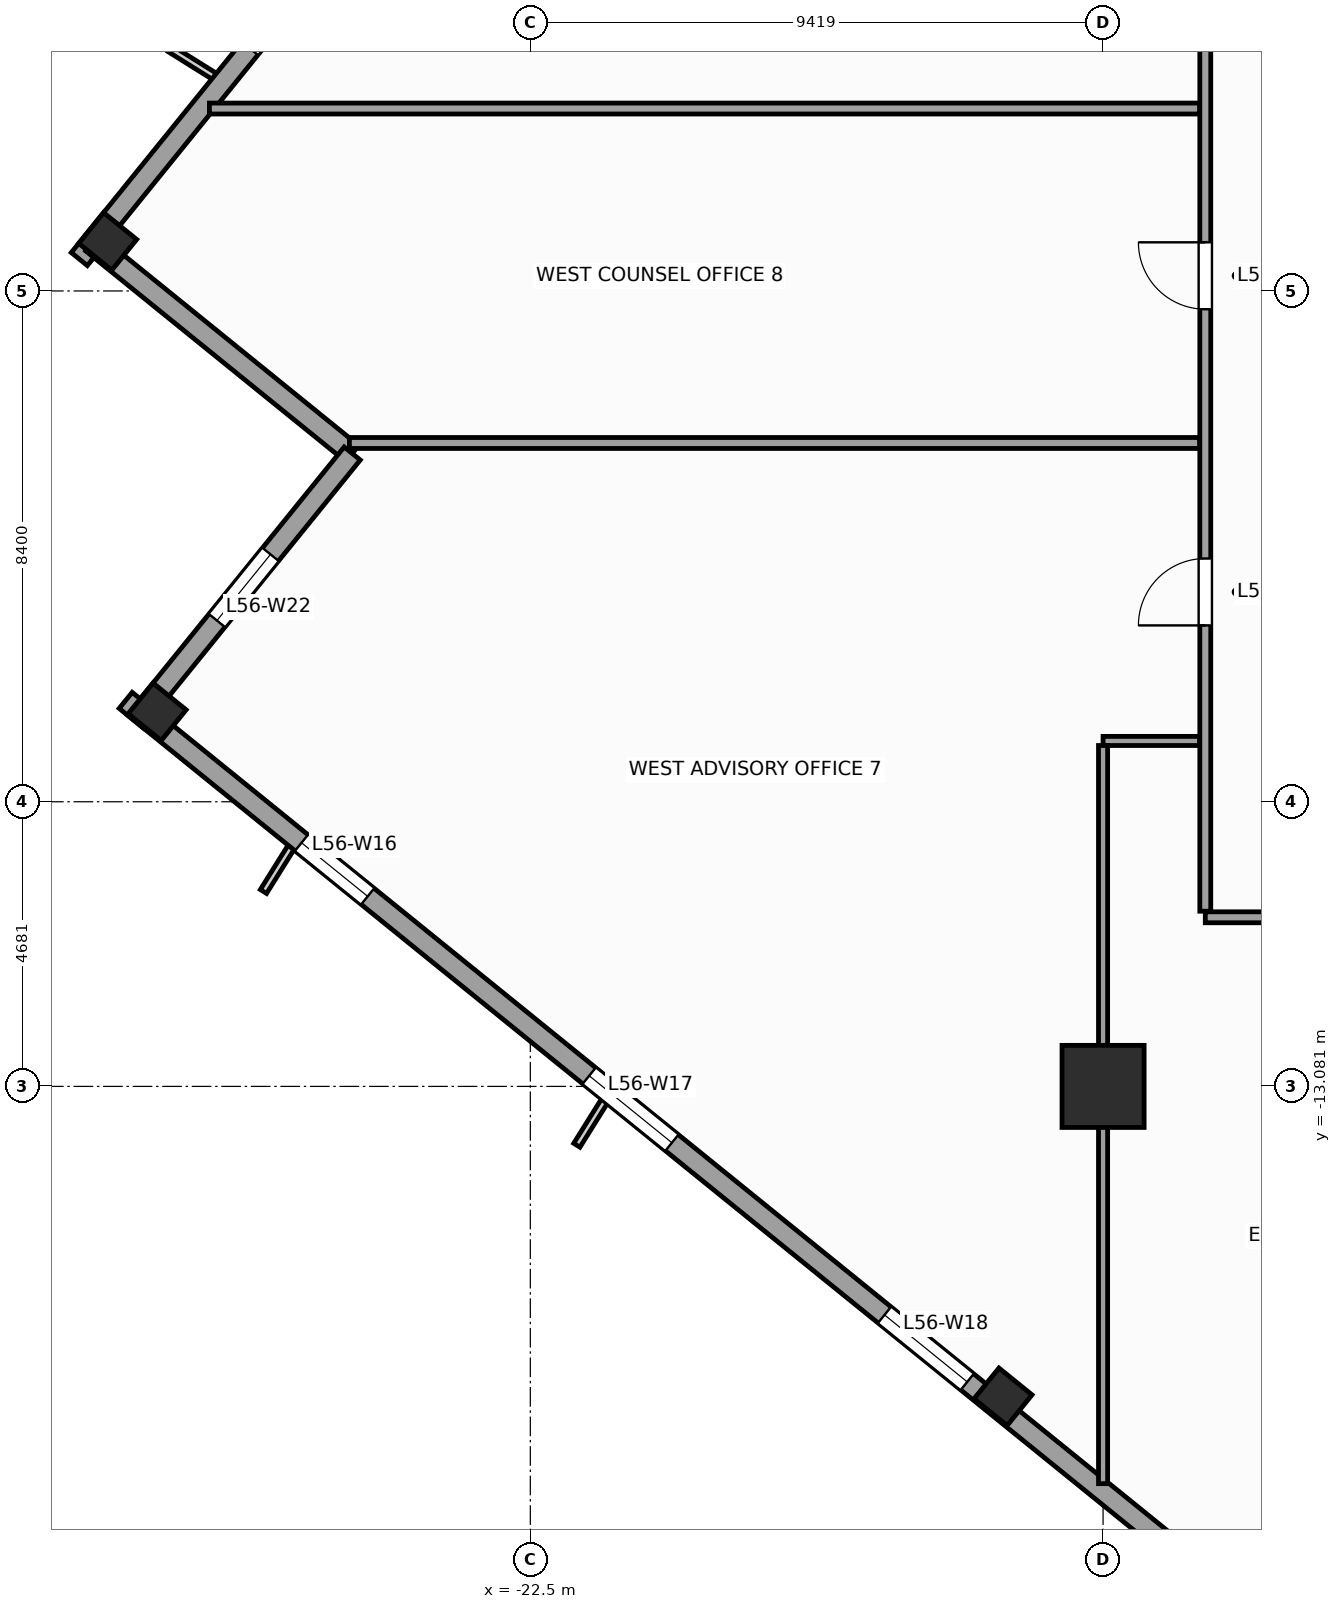
"""IFC4 building model, lengths in metres.
Left out: names, types, materials, properties, quantities, classifications, styles, units other than length and angle.
Written with IfcOpenShell. Run it as: python <this file> out.ifc"""

import sys

from ifc_helpers import new_model, si_unit, direction, frame, frame_2d, origin, origin_2d, place, context, subcontext, project, spatial, rectangle, extrude, source, transform, mapped, element, fill, save


model = new_model("IFC4")
c1 = context("Model", 3, precision=1e-05, world=origin(), true_north=direction((0.0, 1.0)))
c2 = subcontext(c1, "Body", "Model", "MODEL_VIEW")
j1 = project(units=[si_unit("LENGTHUNIT", "METRE"), si_unit("PLANEANGLEUNIT", "RADIAN")], contexts=[c1])
p1 = place(None, origin())
s1 = spatial("IfcSite", under=j1, at=p1, CompositionType="ELEMENT")
p2 = place(p1, origin())
s2 = spatial("IfcBuilding", under=s1, at=p2, CompositionType="ELEMENT")
p3 = place(p2, frame((0.0, 0.0, 232.9)))
s3 = spatial("IfcBuildingStorey", under=s2, at=p3, CompositionType="ELEMENT", Elevation=232.9)
m1 = source(origin(), c2, "Body", "SweptSolid", [
    extrude(rectangle(XDim=1.35, YDim=1.35, at=origin_2d()), origin(), (0.0, 0.0, 1.0), 3.9),
])
p4 = place(p3, frame((-13.081, -13.081, 0.0), z_axis=(0.0, 0.0, 1.0), x_axis=(1.0, 0.0, 0.0)))
e1 = element("IfcColumn", 1, at=p4, inside=s3, PredefinedType="COLUMN", context=c2, shape_type="MappedRepresentation", body=[
    mapped(m1, transform((0.0, 0.0, 0.0), scale=1.0)),
])
m2 = source(origin(), c2, "Body", "SweptSolid", [
    extrude(rectangle(XDim=0.65, YDim=0.7, at=origin_2d()), origin(), (0.0, 0.0, 1.0), 3.9),
])
for number, where, z_axis, x_axis in (
    (2, (-29.45, 0.815, 0.0), (0.0, 0.0, 1.0), (0.629, 0.777, 0.0)),
    (3, (-28.637, -6.92, 0.0), (0.0, 0.0, 1.0), (0.629, 0.777, 0.0)),
    (4, (-14.726, -18.185, 0.0), (0.0, 0.0, 1.0), (0.629, 0.777, 0.0)),
):
    element("IfcColumn", number, at=place(p3, frame(where, z_axis=z_axis, x_axis=x_axis)), inside=s3, PredefinedType="COLUMN", context=c2, shape_type="MappedRepresentation", body=[
        mapped(m2, transform((0.0, 0.0, 0.0), scale=1.0)),
    ])
p5 = place(p3, frame((-6.733, 29.154, 0.0), z_axis=(0.0, 0.0, 1.0), x_axis=(-0.629325378072, -0.77714192302, 0.0)))
e5 = element("IfcWall", 5, at=p5, inside=s3, PredefinedType="STANDARD", context=c2, shape_type="SweptSolid", body=[
    extrude(rectangle(XDim=36.84, YDim=0.34, at=frame_2d((18.42, 0.0))), origin(), (0.0, 0.0, 1.0), 2.96),
])
p6 = place(p5, frame((23.495, 0.0, 0.0)))
e6 = element("IfcOpeningElement", 6, at=p6, cuts=e5, PredefinedType="OPENING", context=c2, shape_type="SweptSolid", body=[
    extrude(rectangle(XDim=1.05, YDim=2.25, at=frame_2d((0.525, 1.125))), frame((0.0, 0.18, 0.0), z_axis=(0.0, -1.0, 0.0), x_axis=(1.0, 0.0, 0.0)), (0.0, 0.0, 1.0), 0.36),
])
p7 = place(p5, frame((3.721, 0.0, 0.48)))
e7 = element("IfcOpeningElement", 7, at=p7, cuts=e5, PredefinedType="OPENING", context=c2, shape_type="SweptSolid", body=[
    extrude(rectangle(XDim=1.4, YDim=2.4, at=frame_2d((0.7, 1.2))), frame((0.0, 0.18, 0.0), z_axis=(0.0, -1.0, 0.0), x_axis=(1.0, 0.0, 0.0)), (0.0, 0.0, 1.0), 0.36),
])
p8 = place(p5, frame((10.559, 0.0, 0.58)))
e8 = element("IfcOpeningElement", 8, at=p8, cuts=e5, PredefinedType="OPENING", context=c2, shape_type="SweptSolid", body=[
    extrude(rectangle(XDim=1.75, YDim=2.3, at=frame_2d((0.875, 1.15))), frame((0.0, 0.18, 0.0), z_axis=(0.0, -1.0, 0.0), x_axis=(1.0, 0.0, 0.0)), (0.0, 0.0, 1.0), 0.36),
])
p9 = place(p5, frame((16.058, 0.0, 0.58)))
e9 = element("IfcOpeningElement", 9, at=p9, cuts=e5, PredefinedType="OPENING", context=c2, shape_type="SweptSolid", body=[
    extrude(rectangle(XDim=1.75, YDim=2.3, at=frame_2d((0.875, 1.15))), frame((0.0, 0.18, 0.0), z_axis=(0.0, -1.0, 0.0), x_axis=(1.0, 0.0, 0.0)), (0.0, 0.0, 1.0), 0.36),
])
p10 = place(p5, frame((25.676, 0.0, 0.58)))
e10 = element("IfcOpeningElement", 10, at=p10, cuts=e5, PredefinedType="OPENING", context=c2, shape_type="SweptSolid", body=[
    extrude(rectangle(XDim=1.75, YDim=2.3, at=frame_2d((0.875, 1.15))), frame((0.0, 0.18, 0.0), z_axis=(0.0, -1.0, 0.0), x_axis=(1.0, 0.0, 0.0)), (0.0, 0.0, 1.0), 0.36),
])
p11 = place(p5, frame((30.982, 0.0, 0.48)))
e11 = element("IfcOpeningElement", 11, at=p11, cuts=e5, PredefinedType="OPENING", context=c2, shape_type="SweptSolid", body=[
    extrude(rectangle(XDim=1.4, YDim=2.4, at=frame_2d((0.7, 1.2))), frame((0.0, 0.18, 0.0), z_axis=(0.0, -1.0, 0.0), x_axis=(1.0, 0.0, 0.0)), (0.0, 0.0, 1.0), 0.36),
])
p12 = place(p3, frame((-29.703, 0.789, 0.0), z_axis=(0.0, 0.0, 1.0), x_axis=(0.77714355312, -0.629323365087, 0.0)))
e12 = element("IfcWall", 12, at=p12, inside=s3, PredefinedType="STANDARD", context=c2, shape_type="SweptSolid", body=[
    extrude(rectangle(XDim=5.5, YDim=0.34, at=frame_2d((2.75, 0.0))), origin(), (0.0, 0.0, 1.0), 3.66),
])
p13 = place(p3, frame((-25.429, -2.673, 0.0), z_axis=(0.0, 0.0, 1.0), x_axis=(-0.629299794138, -0.777162640055, 0.0)))
e13 = element("IfcWall", 13, at=p13, inside=s3, PredefinedType="STANDARD", context=c2, shape_type="SweptSolid", body=[
    extrude(rectangle(XDim=5.67, YDim=0.34, at=frame_2d((2.835, 0.0))), origin(), (0.0, 0.0, 1.0), 3.66),
])
p14 = place(p13, frame((2.135, 0.0, 0.48)))
e14 = element("IfcOpeningElement", 14, at=p14, cuts=e13, PredefinedType="OPENING", context=c2, shape_type="SweptSolid", body=[
    extrude(rectangle(XDim=1.4, YDim=2.4, at=frame_2d((0.7, 1.2))), frame((0.0, 0.18, 0.0), z_axis=(0.0, -1.0, 0.0), x_axis=(1.0, 0.0, 0.0)), (0.0, 0.0, 1.0), 0.36),
])
p15 = place(p3, frame((-29.154, -6.733, 0.0), z_axis=(0.0, 0.0, 1.0), x_axis=(0.77714192302, -0.629325378072, 0.0)))
e15 = element("IfcWall", 15, at=p15, inside=s3, PredefinedType="STANDARD", context=c2, shape_type="SweptSolid", body=[
    extrude(rectangle(XDim=36.84, YDim=0.34, at=frame_2d((18.42, 0.0))), origin(), (0.0, 0.0, 1.0), 2.96),
])
p16 = place(p15, frame((3.721, 0.0, 0.48)))
e16 = element("IfcOpeningElement", 16, at=p16, cuts=e15, PredefinedType="OPENING", context=c2, shape_type="SweptSolid", body=[
    extrude(rectangle(XDim=1.4, YDim=2.4, at=frame_2d((0.7, 1.2))), frame((0.0, 0.18, 0.0), z_axis=(0.0, -1.0, 0.0), x_axis=(1.0, 0.0, 0.0)), (0.0, 0.0, 1.0), 0.36),
])
p17 = place(p15, frame((9.809, 0.0, 0.58)))
e17 = element("IfcOpeningElement", 17, at=p17, cuts=e15, PredefinedType="OPENING", context=c2, shape_type="SweptSolid", body=[
    extrude(rectangle(XDim=1.75, YDim=2.3, at=frame_2d((0.875, 1.15))), frame((0.0, 0.18, 0.0), z_axis=(0.0, -1.0, 0.0), x_axis=(1.0, 0.0, 0.0)), (0.0, 0.0, 1.0), 0.36),
])
p18 = place(p15, frame((16.058, 0.0, 0.58)))
e18 = element("IfcOpeningElement", 18, at=p18, cuts=e15, PredefinedType="OPENING", context=c2, shape_type="SweptSolid", body=[
    extrude(rectangle(XDim=1.75, YDim=2.3, at=frame_2d((0.875, 1.15))), frame((0.0, 0.18, 0.0), z_axis=(0.0, -1.0, 0.0), x_axis=(1.0, 0.0, 0.0)), (0.0, 0.0, 1.0), 0.36),
])
p19 = place(p15, frame((24.176, 0.0, 0.58)))
e19 = element("IfcOpeningElement", 19, at=p19, cuts=e15, PredefinedType="OPENING", context=c2, shape_type="SweptSolid", body=[
    extrude(rectangle(XDim=1.75, YDim=2.3, at=frame_2d((0.875, 1.15))), frame((0.0, 0.18, 0.0), z_axis=(0.0, -1.0, 0.0), x_axis=(1.0, 0.0, 0.0)), (0.0, 0.0, 1.0), 0.36),
])
p20 = place(p15, frame((32.482, 0.0, 0.48)))
e20 = element("IfcOpeningElement", 20, at=p20, cuts=e15, PredefinedType="OPENING", context=c2, shape_type="SweptSolid", body=[
    extrude(rectangle(XDim=1.4, YDim=2.4, at=frame_2d((0.7, 1.2))), frame((0.0, 0.18, 0.0), z_axis=(0.0, -1.0, 0.0), x_axis=(1.0, 0.0, 0.0)), (0.0, 0.0, 1.0), 0.36),
])
p21 = place(p3, frame((-11.4, -10.3, 0.0), z_axis=(0.0, 0.0, 1.0), x_axis=(1.0, 0.0, 0.0)))
e21 = element("IfcWall", 21, at=p21, inside=s3, PredefinedType="PARTITIONING", context=c2, shape_type="SweptSolid", body=[
    extrude(rectangle(XDim=21.7, YDim=0.18, at=frame_2d((10.85, 0.0))), origin(), (0.0, 0.0, 1.0), 3.66),
])
p22 = place(p21, frame((12.989, 0.0, 0.0)))
e22 = element("IfcOpeningElement", 22, at=p22, cuts=e21, PredefinedType="OPENING", context=c2, shape_type="SweptSolid", body=[
    extrude(rectangle(XDim=0.95, YDim=2.1, at=frame_2d((0.475, 1.05))), frame((0.0, 0.1, 0.0), z_axis=(0.0, -1.0, 0.0), x_axis=(1.0, 0.0, 0.0)), (0.0, 0.0, 1.0), 0.2),
])
p23 = place(p21, frame((17.585, 0.0, 0.0)))
e23 = element("IfcOpeningElement", 23, at=p23, cuts=e21, PredefinedType="OPENING", context=c2, shape_type="SweptSolid", body=[
    extrude(rectangle(XDim=1.1, YDim=2.2, at=frame_2d((0.55, 1.1))), frame((0.0, 0.1, 0.0), z_axis=(0.0, -1.0, 0.0), x_axis=(1.0, 0.0, 0.0)), (0.0, 0.0, 1.0), 0.2),
])
p24 = place(p21, frame((9.075, 0.0, 0.0)))
e24 = element("IfcOpeningElement", 24, at=p24, cuts=e21, PredefinedType="OPENING", context=c2, shape_type="SweptSolid", body=[
    extrude(rectangle(XDim=1.1, YDim=2.2, at=frame_2d((0.55, 1.1))), frame((0.0, 0.1, 0.0), z_axis=(0.0, -1.0, 0.0), x_axis=(1.0, 0.0, 0.0)), (0.0, 0.0, 1.0), 0.2),
])
p25 = place(p21, frame((3.724, 0.0, 0.0)))
e25 = element("IfcOpeningElement", 25, at=p25, cuts=e21, PredefinedType="OPENING", context=c2, shape_type="SweptSolid", body=[
    extrude(rectangle(XDim=1.1, YDim=2.2, at=frame_2d((0.55, 1.1))), frame((0.0, 0.1, 0.0), z_axis=(0.0, -1.0, 0.0), x_axis=(1.0, 0.0, 0.0)), (0.0, 0.0, 1.0), 0.2),
])
p26 = place(p3, frame((-11.4, -10.2, 0.0), z_axis=(0.0, 0.0, 1.0), x_axis=(0.0, 1.0, 0.0)))
e26 = element("IfcWall", 26, at=p26, inside=s3, PredefinedType="PARTITIONING", context=c2, shape_type="SweptSolid", body=[
    extrude(rectangle(XDim=20.4, YDim=0.18, at=frame_2d((10.2, 0.0))), origin(), (0.0, 0.0, 1.0), 3.66),
])
p27 = place(p26, frame((14.85, 0.0, 0.0)))
e27 = element("IfcOpeningElement", 27, at=p27, cuts=e26, PredefinedType="OPENING", context=c2, shape_type="SweptSolid", body=[
    extrude(rectangle(XDim=1.1, YDim=2.2, at=frame_2d((0.55, 1.1))), frame((0.0, 0.1, 0.0), z_axis=(0.0, -1.0, 0.0), x_axis=(1.0, 0.0, 0.0)), (0.0, 0.0, 1.0), 0.2),
])
p28 = place(p26, frame((4.7, 0.0, 0.0)))
e28 = element("IfcOpeningElement", 28, at=p28, cuts=e26, PredefinedType="OPENING", context=c2, shape_type="SweptSolid", body=[
    extrude(rectangle(XDim=1.1, YDim=2.2, at=frame_2d((0.55, 1.1))), frame((0.0, 0.1, 0.0), z_axis=(0.0, -1.0, 0.0), x_axis=(1.0, 0.0, 0.0)), (0.0, 0.0, 1.0), 0.2),
])
p29 = place(p26, frame((9.9, 0.0, 0.0)))
e29 = element("IfcOpeningElement", 29, at=p29, cuts=e26, PredefinedType="OPENING", context=c2, shape_type="SweptSolid", body=[
    extrude(rectangle(XDim=1.1, YDim=2.2, at=frame_2d((0.55, 1.1))), frame((0.0, 0.1, 0.0), z_axis=(0.0, -1.0, 0.0), x_axis=(1.0, 0.0, 0.0)), (0.0, 0.0, 1.0), 0.2),
])
p30 = place(p3, frame((-11.495, -2.5, 0.0), z_axis=(0.0, 0.0, 1.0), x_axis=(-1.0, 0.0, 0.0)))
e30 = element("IfcWall", 30, at=p30, inside=s3, PredefinedType="PARTITIONING", context=c2, shape_type="SweptSolid", body=[
    extrude(rectangle(XDim=13.98, YDim=0.18, at=frame_2d((6.99, 0.0))), origin(), (0.0, 0.0, 1.0), 3.66),
])
p31 = place(p3, frame((-11.495, 3.0, 0.0), z_axis=(0.0, 0.0, 1.0), x_axis=(-1.0, 0.0, 0.0)))
e31 = element("IfcWall", 31, at=p31, inside=s3, PredefinedType="PARTITIONING", context=c2, shape_type="SweptSolid", body=[
    extrude(rectangle(XDim=16.282, YDim=0.18, at=frame_2d((8.141, 0.0))), origin(), (0.0, 0.0, 1.0), 3.66),
])
p32 = place(p3, frame((-11.495, -7.4, 0.0), z_axis=(0.0, 0.0, 1.0), x_axis=(-1.0, 0.0, 0.0)))
e32 = element("IfcWall", 32, at=p32, inside=s3, PredefinedType="PARTITIONING", context=c2, shape_type="SweptSolid", body=[
    extrude(rectangle(XDim=1.586, YDim=0.15, at=frame_2d((0.793, 0.0))), origin(), (0.0, 0.0, 1.0), 3.66),
])
p33 = place(p3, frame((-13.081, -7.475, 0.0), z_axis=(0.0, 0.0, 1.0), x_axis=(0.0, -1.0, 0.0)))
e33 = element("IfcWall", 33, at=p33, inside=s3, PredefinedType="PARTITIONING", context=c2, shape_type="SweptSolid", body=[
    extrude(rectangle(XDim=12.139, YDim=0.15, at=frame_2d((6.069, 0.0))), origin(), (0.0, 0.0, 1.0), 2.76),
])
m3 = source(origin(), c2, "Body", "SweptSolid", [
    extrude(rectangle(XDim=1.4, YDim=2.4, at=frame_2d((0.7, 1.2))), frame((0.0, 0.03, 0.0), z_axis=(0.0, -1.0, 0.0), x_axis=(1.0, 0.0, 0.0)), (0.0, 0.0, 1.0), 0.06),
])
p34 = place(p16, origin())
e34 = element("IfcWindow", 34, at=p34, inside=s3, PartitioningType="SINGLE_PANEL", PredefinedType="WINDOW", context=c2, shape_type="MappedRepresentation", body=[
    mapped(m3, transform((0.0, 0.0, 0.0), scale=1.0)),
])
fill(e16, e34)
m4 = source(origin(), c2, "Body", "SweptSolid", [
    extrude(rectangle(XDim=1.75, YDim=2.3, at=frame_2d((0.875, 1.15))), frame((0.0, 0.03, 0.0), z_axis=(0.0, -1.0, 0.0), x_axis=(1.0, 0.0, 0.0)), (0.0, 0.0, 1.0), 0.06),
])
p35 = place(p17, origin())
e35 = element("IfcWindow", 35, at=p35, inside=s3, PartitioningType="SINGLE_PANEL", PredefinedType="WINDOW", context=c2, shape_type="MappedRepresentation", body=[
    mapped(m4, transform((0.0, 0.0, 0.0), scale=1.0)),
])
fill(e17, e35)
p36 = place(p18, origin())
e36 = element("IfcWindow", 36, at=p36, inside=s3, PartitioningType="SINGLE_PANEL", PredefinedType="WINDOW", context=c2, shape_type="MappedRepresentation", body=[
    mapped(m4, transform((0.0, 0.0, 0.0), scale=1.0)),
])
fill(e18, e36)
p37 = place(p14, origin())
e37 = element("IfcWindow", 37, at=p37, inside=s3, PartitioningType="SINGLE_PANEL", PredefinedType="WINDOW", context=c2, shape_type="MappedRepresentation", body=[
    mapped(m3, transform((0.0, 0.0, 0.0), scale=1.0)),
])
fill(e14, e37)
m5 = source(origin(), c2, "Body", "SweptSolid", [
    extrude(rectangle(XDim=1.1, YDim=2.2, at=frame_2d((0.55, 1.1))), frame((0.0, 0.025, 0.0), z_axis=(0.0, -1.0, 0.0), x_axis=(1.0, 0.0, 0.0)), (0.0, 0.0, 1.0), 0.05),
])
p38 = place(p28, origin())
e38 = element("IfcDoor", 38, at=p38, inside=s3, OperationType="SINGLE_SWING_LEFT", PredefinedType="DOOR", context=c2, shape_type="MappedRepresentation", body=[
    mapped(m5, transform((0.0, 0.0, 0.0), scale=1.0)),
])
fill(e28, e38)
p39 = place(p29, origin())
e39 = element("IfcDoor", 39, at=p39, inside=s3, OperationType="SINGLE_SWING_RIGHT", PredefinedType="DOOR", context=c2, shape_type="MappedRepresentation", body=[
    mapped(m5, transform((0.0, 0.0, 0.0), scale=1.0)),
])
fill(e29, e39)
save(model, sys.argv[1])
